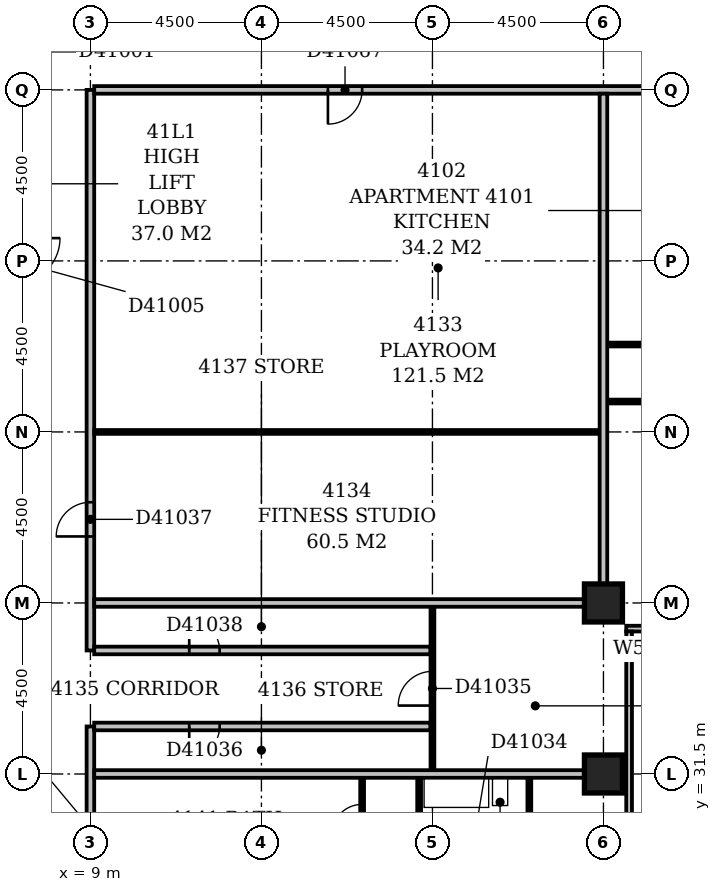
"""IFC4 building model, lengths in metres.
Left out: names, types, materials, properties, quantities, classifications, styles, units other than length and angle.
Written with IfcOpenShell. Run it as: python <this file> out.ifc"""

import sys

from ifc_helpers import new_model, si_unit, direction, frame, frame_2d, origin, origin_2d, place, context, subcontext, project, spatial, rectangle, extrude, element, fill, save


model = new_model("IFC4")
c1 = context("Model", 3, precision=1e-05, world=origin(), true_north=direction((0.0, 1.0)))
c2 = subcontext(c1, "Body", "Model", "MODEL_VIEW")
j1 = project(units=[si_unit("LENGTHUNIT", "METRE"), si_unit("PLANEANGLEUNIT", "RADIAN")], contexts=[c1])
p1 = place(None, origin())
s1 = spatial("IfcSite", under=j1, at=p1, CompositionType="ELEMENT")
p2 = place(p1, origin())
s2 = spatial("IfcBuilding", under=s1, at=p2, CompositionType="ELEMENT")
p3 = place(p2, frame((0.0, 0.0, 162.8)))
s3 = spatial("IfcBuildingStorey", under=s2, at=p3, CompositionType="ELEMENT", Elevation=162.8)
for number, where, z_axis, x_axis in (
    (1, (22.5, 31.5, -0.3), (0.0, 0.0, 1.0), (1.0, 0.0, 0.0)),
    (2, (22.5, 36.0, -0.3), (0.0, 0.0, 1.0), (1.0, 0.0, 0.0)),
):
    element("IfcColumn", number, at=place(p3, frame(where, z_axis=z_axis, x_axis=x_axis)), inside=s3, PredefinedType="COLUMN", context=c2, shape_type="SweptSolid", body=[
        extrude(rectangle(XDim=1.0, YDim=1.0, at=origin_2d()), origin(), (0.0, 0.0, 1.0), 3.6),
    ])
p4 = place(p3, frame((23.175, 17.4, 0.0), z_axis=(0.0, 0.0, 1.0), x_axis=(0.0, 1.0, 0.0)))
e3 = element("IfcWall", 3, at=p4, inside=s3, PredefinedType="STANDARD", context=c2, shape_type="SweptSolid", body=[
    extrude(rectangle(XDim=17.85, YDim=0.15, at=frame_2d((8.925, 0.0))), origin(), (0.0, 0.0, 1.0), 2.7),
])
p5 = place(p4, frame((1.65, 0.0, 0.6)))
e4 = element("IfcOpeningElement", 4, at=p5, cuts=e3, PredefinedType="OPENING", context=c2, shape_type="SweptSolid", body=[
    extrude(rectangle(XDim=2.4, YDim=1.8, at=frame_2d((1.2, 0.9))), frame((0.0, 0.087, 0.0), z_axis=(0.0, -1.0, 0.0), x_axis=(1.0, 0.0, 0.0)), (0.0, 0.0, 1.0), 0.174),
])
p6 = place(p4, frame((6.15, 0.0, 0.6)))
e5 = element("IfcOpeningElement", 5, at=p6, cuts=e3, PredefinedType="OPENING", context=c2, shape_type="SweptSolid", body=[
    extrude(rectangle(XDim=2.4, YDim=1.8, at=frame_2d((1.2, 0.9))), frame((0.0, 0.087, 0.0), z_axis=(0.0, -1.0, 0.0), x_axis=(1.0, 0.0, 0.0)), (0.0, 0.0, 1.0), 0.174),
])
p7 = place(p4, frame((10.65, 0.0, 0.6)))
e6 = element("IfcOpeningElement", 6, at=p7, cuts=e3, PredefinedType="OPENING", context=c2, shape_type="SweptSolid", body=[
    extrude(rectangle(XDim=2.4, YDim=1.8, at=frame_2d((1.2, 0.9))), frame((0.0, 0.087, 0.0), z_axis=(0.0, -1.0, 0.0), x_axis=(1.0, 0.0, 0.0)), (0.0, 0.0, 1.0), 0.174),
])
p8 = place(p4, frame((17.152, 0.0, 0.6)))
e7 = element("IfcOpeningElement", 7, at=p8, cuts=e3, PredefinedType="OPENING", context=c2, shape_type="SweptSolid", body=[
    extrude(rectangle(XDim=0.45, YDim=1.8, at=frame_2d((0.225, 0.9))), frame((0.0, 0.087, 0.0), z_axis=(0.0, -1.0, 0.0), x_axis=(1.0, 0.0, 0.0)), (0.0, 0.0, 1.0), 0.174),
])
p9 = place(p3, frame((23.1, 35.325, 0.0), z_axis=(0.0, 0.0, 1.0), x_axis=(1.0, 0.0, 0.0)))
e8 = element("IfcWall", 8, at=p9, inside=s3, PredefinedType="STANDARD", context=c2, shape_type="SweptSolid", body=[
    extrude(rectangle(XDim=45.15, YDim=0.15, at=frame_2d((22.575, 0.0))), origin(), (0.0, 0.0, 1.0), 2.7),
])
p10 = place(p9, frame((0.45, 0.0, 0.6)))
e9 = element("IfcOpeningElement", 9, at=p10, cuts=e8, PredefinedType="OPENING", context=c2, shape_type="SweptSolid", body=[
    extrude(rectangle(XDim=2.4, YDim=1.8, at=frame_2d((1.2, 0.9))), frame((0.0, 0.087, 0.0), z_axis=(0.0, -1.0, 0.0), x_axis=(1.0, 0.0, 0.0)), (0.0, 0.0, 1.0), 0.174),
])
p11 = place(p9, frame((4.95, 0.0, 0.6)))
e10 = element("IfcOpeningElement", 10, at=p11, cuts=e8, PredefinedType="OPENING", context=c2, shape_type="SweptSolid", body=[
    extrude(rectangle(XDim=2.4, YDim=1.8, at=frame_2d((1.2, 0.9))), frame((0.0, 0.087, 0.0), z_axis=(0.0, -1.0, 0.0), x_axis=(1.0, 0.0, 0.0)), (0.0, 0.0, 1.0), 0.174),
])
p12 = place(p9, frame((9.167, 0.0, 0.6)))
e11 = element("IfcOpeningElement", 11, at=p12, cuts=e8, PredefinedType="OPENING", context=c2, shape_type="SweptSolid", body=[
    extrude(rectangle(XDim=1.8, YDim=1.8, at=frame_2d((0.9, 0.9))), frame((0.0, 0.087, 0.0), z_axis=(0.0, -1.0, 0.0), x_axis=(1.0, 0.0, 0.0)), (0.0, 0.0, 1.0), 0.174),
])
p13 = place(p9, frame((14.895, 0.0, 0.6)))
e12 = element("IfcOpeningElement", 12, at=p13, cuts=e8, PredefinedType="OPENING", context=c2, shape_type="SweptSolid", body=[
    extrude(rectangle(XDim=1.8, YDim=1.8, at=frame_2d((0.9, 0.9))), frame((0.0, 0.087, 0.0), z_axis=(0.0, -1.0, 0.0), x_axis=(1.0, 0.0, 0.0)), (0.0, 0.0, 1.0), 0.174),
])
p14 = place(p9, frame((18.45, 0.0, 0.6)))
e13 = element("IfcOpeningElement", 13, at=p14, cuts=e8, PredefinedType="OPENING", context=c2, shape_type="SweptSolid", body=[
    extrude(rectangle(XDim=2.4, YDim=1.8, at=frame_2d((1.2, 0.9))), frame((0.0, 0.087, 0.0), z_axis=(0.0, -1.0, 0.0), x_axis=(1.0, 0.0, 0.0)), (0.0, 0.0, 1.0), 0.174),
])
p15 = place(p9, frame((22.95, 0.0, 0.6)))
e14 = element("IfcOpeningElement", 14, at=p15, cuts=e8, PredefinedType="OPENING", context=c2, shape_type="SweptSolid", body=[
    extrude(rectangle(XDim=2.4, YDim=1.8, at=frame_2d((1.2, 0.9))), frame((0.0, 0.087, 0.0), z_axis=(0.0, -1.0, 0.0), x_axis=(1.0, 0.0, 0.0)), (0.0, 0.0, 1.0), 0.174),
])
p16 = place(p9, frame((27.45, 0.0, 0.6)))
e15 = element("IfcOpeningElement", 15, at=p16, cuts=e8, PredefinedType="OPENING", context=c2, shape_type="SweptSolid", body=[
    extrude(rectangle(XDim=2.4, YDim=1.8, at=frame_2d((1.2, 0.9))), frame((0.0, 0.087, 0.0), z_axis=(0.0, -1.0, 0.0), x_axis=(1.0, 0.0, 0.0)), (0.0, 0.0, 1.0), 0.174),
])
p17 = place(p9, frame((31.95, 0.0, 0.6)))
e16 = element("IfcOpeningElement", 16, at=p17, cuts=e8, PredefinedType="OPENING", context=c2, shape_type="SweptSolid", body=[
    extrude(rectangle(XDim=2.4, YDim=1.8, at=frame_2d((1.2, 0.9))), frame((0.0, 0.087, 0.0), z_axis=(0.0, -1.0, 0.0), x_axis=(1.0, 0.0, 0.0)), (0.0, 0.0, 1.0), 0.174),
])
p18 = place(p9, frame((36.45, 0.0, 0.6)))
e17 = element("IfcOpeningElement", 17, at=p18, cuts=e8, PredefinedType="OPENING", context=c2, shape_type="SweptSolid", body=[
    extrude(rectangle(XDim=2.4, YDim=1.8, at=frame_2d((1.2, 0.9))), frame((0.0, 0.087, 0.0), z_axis=(0.0, -1.0, 0.0), x_axis=(1.0, 0.0, 0.0)), (0.0, 0.0, 1.0), 0.174),
])
p19 = place(p9, frame((40.61, 0.0, 0.6)))
e18 = element("IfcOpeningElement", 18, at=p19, cuts=e8, PredefinedType="OPENING", context=c2, shape_type="SweptSolid", body=[
    extrude(rectangle(XDim=1.2, YDim=1.8, at=frame_2d((0.6, 0.9))), frame((0.0, 0.087, 0.0), z_axis=(0.0, -1.0, 0.0), x_axis=(1.0, 0.0, 0.0)), (0.0, 0.0, 1.0), 0.174),
])
p20 = place(p3, frame((9.0, 5.0, 0.0), z_axis=(0.0, 0.0, 1.0), x_axis=(0.0, 1.0, 0.0)))
e19 = element("IfcWall", 19, at=p20, inside=s3, PredefinedType="PARTITIONING", context=c2, shape_type="SweptSolid", body=[
    extrude(rectangle(XDim=27.75, YDim=0.2, at=frame_2d((13.875, 0.0))), origin(), (0.0, 0.0, 1.0), 3.3),
])
p21 = place(p20, frame((22.8, 0.0, 0.0)))
e20 = element("IfcOpeningElement", 20, at=p21, cuts=e19, PredefinedType="OPENING", context=c2, shape_type="SweptSolid", body=[
    extrude(rectangle(XDim=1.0, YDim=2.1, at=frame_2d((0.5, 1.05))), frame((0.0, 0.112, 0.0), z_axis=(0.0, -1.0, 0.0), x_axis=(1.0, 0.0, 0.0)), (0.0, 0.0, 1.0), 0.224),
])
p22 = place(p20, frame((14.95, 0.0, 0.0)))
e21 = element("IfcOpeningElement", 21, at=p22, cuts=e19, PredefinedType="OPENING", context=c2, shape_type="SweptSolid", body=[
    extrude(rectangle(XDim=1.0, YDim=2.1, at=frame_2d((0.5, 1.05))), frame((0.0, 0.112, 0.0), z_axis=(0.0, -1.0, 0.0), x_axis=(1.0, 0.0, 0.0)), (0.0, 0.0, 1.0), 0.224),
])
p23 = place(p20, frame((9.3, 0.0, 0.0)))
e22 = element("IfcOpeningElement", 22, at=p23, cuts=e19, PredefinedType="OPENING", context=c2, shape_type="SweptSolid", body=[
    extrude(rectangle(XDim=1.0, YDim=2.1, at=frame_2d((0.5, 1.05))), frame((0.0, 0.112, 0.0), z_axis=(0.0, -1.0, 0.0), x_axis=(1.0, 0.0, 0.0)), (0.0, 0.0, 1.0), 0.224),
])
p24 = place(p20, frame((1.5, 0.0, 0.0)))
e23 = element("IfcOpeningElement", 23, at=p24, cuts=e19, PredefinedType="OPENING", context=c2, shape_type="SweptSolid", body=[
    extrude(rectangle(XDim=0.9, YDim=2.1, at=frame_2d((0.45, 1.05))), frame((0.0, 0.112, 0.0), z_axis=(0.0, -1.0, 0.0), x_axis=(1.0, 0.0, 0.0)), (0.0, 0.0, 1.0), 0.224),
])
p25 = place(p3, frame((17.65, 22.6, 0.0), z_axis=(0.0, 0.0, 1.0), x_axis=(0.0, 1.0, 0.0)))
e24 = element("IfcWall", 24, at=p25, inside=s3, PredefinedType="PARTITIONING", context=c2, shape_type="SweptSolid", body=[
    extrude(rectangle(XDim=8.8, YDim=0.1, at=frame_2d((4.4, 0.0))), origin(), (0.0, 0.0, 1.0), 3.3),
])
p26 = place(p25, frame((1.7, 0.0, 0.0)))
e25 = element("IfcOpeningElement", 25, at=p26, cuts=e24, PredefinedType="OPENING", context=c2, shape_type="SweptSolid", body=[
    extrude(rectangle(XDim=0.9, YDim=2.1, at=frame_2d((0.45, 1.05))), frame((0.0, 0.062, 0.0), z_axis=(0.0, -1.0, 0.0), x_axis=(1.0, 0.0, 0.0)), (0.0, 0.0, 1.0), 0.124),
])
p27 = place(p25, frame((5.05, 0.0, 0.0)))
e26 = element("IfcOpeningElement", 26, at=p27, cuts=e24, PredefinedType="OPENING", context=c2, shape_type="SweptSolid", body=[
    extrude(rectangle(XDim=0.9, YDim=2.1, at=frame_2d((0.45, 1.05))), frame((0.0, 0.062, 0.0), z_axis=(0.0, -1.0, 0.0), x_axis=(1.0, 0.0, 0.0)), (0.0, 0.0, 1.0), 0.124),
])
p28 = place(p3, frame((16.15, 29.1, 0.0), z_axis=(0.0, 0.0, 1.0), x_axis=(0.0, 1.0, 0.0)))
e27 = element("IfcWall", 27, at=p28, inside=s3, PredefinedType="PARTITIONING", context=c2, shape_type="SweptSolid", body=[
    extrude(rectangle(XDim=2.3, YDim=0.1, at=frame_2d((1.15, 0.0))), origin(), (0.0, 0.0, 1.0), 3.3),
])
p29 = place(p28, frame((0.8, 0.0, 0.0)))
e28 = element("IfcOpeningElement", 28, at=p29, cuts=e27, PredefinedType="OPENING", context=c2, shape_type="SweptSolid", body=[
    extrude(rectangle(XDim=0.8, YDim=2.1, at=frame_2d((0.4, 1.05))), frame((0.0, 0.062, 0.0), z_axis=(0.0, -1.0, 0.0), x_axis=(1.0, 0.0, 0.0)), (0.0, 0.0, 1.0), 0.124),
])
p30 = place(p3, frame((20.55, 29.2, 0.0), z_axis=(0.0, 0.0, 1.0), x_axis=(0.0, 1.0, 0.0)))
e29 = element("IfcWall", 29, at=p30, inside=s3, PredefinedType="PLUMBINGWALL", context=c2, shape_type="SweptSolid", body=[
    extrude(rectangle(XDim=2.2, YDim=0.1, at=frame_2d((1.1, 0.0))), origin(), (0.0, 0.0, 1.0), 3.3),
])
p31 = place(p3, frame((9.1, 31.5, 0.0), z_axis=(0.0, 0.0, 1.0), x_axis=(1.0, 0.0, 0.0)))
e30 = element("IfcWall", 30, at=p31, inside=s3, PredefinedType="PARTITIONING", context=c2, shape_type="SweptSolid", body=[
    extrude(rectangle(XDim=12.9, YDim=0.2, at=frame_2d((6.45, 0.0))), origin(), (0.0, 0.0, 1.0), 3.3),
])
p32 = place(p3, frame((18.0, 31.6, 0.0), z_axis=(0.0, 0.0, 1.0), x_axis=(0.0, 1.0, 0.0)))
e31 = element("IfcWall", 31, at=p32, inside=s3, PredefinedType="PARTITIONING", context=c2, shape_type="SweptSolid", body=[
    extrude(rectangle(XDim=4.3, YDim=0.1, at=frame_2d((2.15, 0.0))), origin(), (0.0, 0.0, 1.0), 3.3),
])
p33 = place(p32, frame((1.7, 0.0, 0.0)))
e32 = element("IfcOpeningElement", 32, at=p33, cuts=e31, PredefinedType="OPENING", context=c2, shape_type="SweptSolid", body=[
    extrude(rectangle(XDim=0.9, YDim=2.1, at=frame_2d((0.45, 1.05))), frame((0.0, 0.062, 0.0), z_axis=(0.0, -1.0, 0.0), x_axis=(1.0, 0.0, 0.0)), (0.0, 0.0, 1.0), 0.124),
])
p34 = place(p3, frame((9.1, 32.75, 0.0), z_axis=(0.0, 0.0, 1.0), x_axis=(1.0, 0.0, 0.0)))
e33 = element("IfcWall", 33, at=p34, inside=s3, PredefinedType="PARTITIONING", context=c2, shape_type="SweptSolid", body=[
    extrude(rectangle(XDim=8.85, YDim=0.2, at=frame_2d((4.425, 0.0))), origin(), (0.0, 0.0, 1.0), 3.3),
])
p35 = place(p34, frame((2.5, 0.0, 0.0)))
e34 = element("IfcOpeningElement", 34, at=p35, cuts=e33, PredefinedType="OPENING", context=c2, shape_type="SweptSolid", body=[
    extrude(rectangle(XDim=0.8, YDim=2.1, at=frame_2d((0.4, 1.05))), frame((0.0, 0.112, 0.0), z_axis=(0.0, -1.0, 0.0), x_axis=(1.0, 0.0, 0.0)), (0.0, 0.0, 1.0), 0.224),
])
p36 = place(p3, frame((9.0, 34.75, 0.0), z_axis=(0.0, 0.0, 1.0), x_axis=(0.0, 1.0, 0.0)))
e35 = element("IfcWall", 35, at=p36, inside=s3, PredefinedType="PARTITIONING", context=c2, shape_type="SweptSolid", body=[
    extrude(rectangle(XDim=14.75, YDim=0.2, at=frame_2d((7.375, 0.0))), origin(), (0.0, 0.0, 1.0), 3.3),
])
p37 = place(p36, frame((3.0, 0.0, 0.0)))
e36 = element("IfcOpeningElement", 36, at=p37, cuts=e35, PredefinedType="OPENING", context=c2, shape_type="SweptSolid", body=[
    extrude(rectangle(XDim=0.9, YDim=2.1, at=frame_2d((0.45, 1.05))), frame((0.0, 0.112, 0.0), z_axis=(0.0, -1.0, 0.0), x_axis=(1.0, 0.0, 0.0)), (0.0, 0.0, 1.0), 0.224),
])
p38 = place(p3, frame((9.1, 34.75, 0.0), z_axis=(0.0, 0.0, 1.0), x_axis=(1.0, 0.0, 0.0)))
e37 = element("IfcWall", 37, at=p38, inside=s3, PredefinedType="PARTITIONING", context=c2, shape_type="SweptSolid", body=[
    extrude(rectangle(XDim=8.85, YDim=0.2, at=frame_2d((4.425, 0.0))), origin(), (0.0, 0.0, 1.0), 3.3),
])
p39 = place(p38, frame((2.5, 0.0, 0.0)))
e38 = element("IfcOpeningElement", 38, at=p39, cuts=e37, PredefinedType="OPENING", context=c2, shape_type="SweptSolid", body=[
    extrude(rectangle(XDim=0.8, YDim=2.1, at=frame_2d((0.4, 1.05))), frame((0.0, 0.112, 0.0), z_axis=(0.0, -1.0, 0.0), x_axis=(1.0, 0.0, 0.0)), (0.0, 0.0, 1.0), 0.224),
])
for number, where, z_axis, x_axis in (
    (39, (9.1, 36.0, 0.0), (0.0, 0.0, 1.0), (1.0, 0.0, 0.0)),
    (40, (22.5, 36.5, 0.0), (0.0, 0.0, 1.0), (0.0, 1.0, 0.0)),
):
    element("IfcWall", number, at=place(p3, frame(where, z_axis=z_axis, x_axis=x_axis)), inside=s3, PredefinedType="PARTITIONING", context=c2, shape_type="SweptSolid", body=[
        extrude(rectangle(XDim=12.9, YDim=0.2, at=frame_2d((6.45, 0.0))), origin(), (0.0, 0.0, 1.0), 3.3),
    ])
p40 = place(p3, frame((9.1, 40.5, 0.0), z_axis=(0.0, 0.0, 1.0), x_axis=(1.0, 0.0, 0.0)))
e41 = element("IfcWall", 41, at=p40, inside=s3, PredefinedType="PARTITIONING", context=c2, shape_type="SweptSolid", body=[
    extrude(rectangle(XDim=13.3, YDim=0.1, at=frame_2d((6.65, 0.0))), origin(), (0.0, 0.0, 1.0), 3.3),
])
p41 = place(p3, frame((22.6, 41.3, 0.0), z_axis=(0.0, 0.0, 1.0), x_axis=(1.0, 0.0, 0.0)))
e42 = element("IfcWall", 42, at=p41, inside=s3, PredefinedType="PARTITIONING", context=c2, shape_type="SweptSolid", body=[
    extrude(rectangle(XDim=17.8, YDim=0.1, at=frame_2d((8.9, 0.0))), origin(), (0.0, 0.0, 1.0), 3.3),
])
p42 = place(p41, frame((3.9, 0.0, 0.0)))
e43 = element("IfcOpeningElement", 43, at=p42, cuts=e42, PredefinedType="OPENING", context=c2, shape_type="SweptSolid", body=[
    extrude(rectangle(XDim=0.9, YDim=2.1, at=frame_2d((0.45, 1.05))), frame((0.0, 0.062, 0.0), z_axis=(0.0, -1.0, 0.0), x_axis=(1.0, 0.0, 0.0)), (0.0, 0.0, 1.0), 0.124),
])
p43 = place(p41, frame((10.7, 0.0, 0.0)))
e44 = element("IfcOpeningElement", 44, at=p43, cuts=e42, PredefinedType="OPENING", context=c2, shape_type="SweptSolid", body=[
    extrude(rectangle(XDim=0.9, YDim=2.1, at=frame_2d((0.45, 1.05))), frame((0.0, 0.062, 0.0), z_axis=(0.0, -1.0, 0.0), x_axis=(1.0, 0.0, 0.0)), (0.0, 0.0, 1.0), 0.124),
])
p44 = place(p41, frame((14.05, 0.0, 0.0)))
e45 = element("IfcOpeningElement", 45, at=p44, cuts=e42, PredefinedType="OPENING", context=c2, shape_type="SweptSolid", body=[
    extrude(rectangle(XDim=0.9, YDim=2.1, at=frame_2d((0.45, 1.05))), frame((0.0, 0.062, 0.0), z_axis=(0.0, -1.0, 0.0), x_axis=(1.0, 0.0, 0.0)), (0.0, 0.0, 1.0), 0.124),
])
p45 = place(p3, frame((22.6, 42.8, 0.0), z_axis=(0.0, 0.0, 1.0), x_axis=(1.0, 0.0, 0.0)))
e46 = element("IfcWall", 46, at=p45, inside=s3, PredefinedType="PARTITIONING", context=c2, shape_type="SweptSolid", body=[
    extrude(rectangle(XDim=4.95, YDim=0.1, at=frame_2d((2.475, 0.0))), origin(), (0.0, 0.0, 1.0), 3.3),
])
p46 = place(p45, frame((2.0, 0.0, 0.0)))
e47 = element("IfcOpeningElement", 47, at=p46, cuts=e46, PredefinedType="OPENING", context=c2, shape_type="SweptSolid", body=[
    extrude(rectangle(XDim=0.9, YDim=2.1, at=frame_2d((0.45, 1.05))), frame((0.0, 0.062, 0.0), z_axis=(0.0, -1.0, 0.0), x_axis=(1.0, 0.0, 0.0)), (0.0, 0.0, 1.0), 0.124),
])
p47 = place(p3, frame((9.1, 49.5, 0.0), z_axis=(0.0, 0.0, 1.0), x_axis=(1.0, 0.0, 0.0)))
e48 = element("IfcWall", 48, at=p47, inside=s3, PredefinedType="PARTITIONING", context=c2, shape_type="SweptSolid", body=[
    extrude(rectangle(XDim=32.55, YDim=0.2, at=frame_2d((16.275, 0.0))), origin(), (0.0, 0.0, 1.0), 3.3),
])
p48 = place(p47, frame((18.8, 0.0, 0.0)))
e49 = element("IfcOpeningElement", 49, at=p48, cuts=e48, PredefinedType="OPENING", context=c2, shape_type="SweptSolid", body=[
    extrude(rectangle(XDim=1.0, YDim=2.1, at=frame_2d((0.5, 1.05))), frame((0.0, 0.112, 0.0), z_axis=(0.0, -1.0, 0.0), x_axis=(1.0, 0.0, 0.0)), (0.0, 0.0, 1.0), 0.224),
])
p49 = place(p47, frame((6.15, 0.0, 0.0)))
e50 = element("IfcOpeningElement", 50, at=p49, cuts=e48, PredefinedType="OPENING", context=c2, shape_type="SweptSolid", body=[
    extrude(rectangle(XDim=0.9, YDim=2.1, at=frame_2d((0.45, 1.05))), frame((0.0, 0.112, 0.0), z_axis=(0.0, -1.0, 0.0), x_axis=(1.0, 0.0, 0.0)), (0.0, 0.0, 1.0), 0.224),
])
p50 = place(p8, origin())
e51 = element("IfcWindow", 51, at=p50, inside=s3, PartitioningType="SINGLE_PANEL", PredefinedType="WINDOW", context=c2, shape_type="SweptSolid", body=[
    extrude(rectangle(XDim=0.45, YDim=1.8, at=frame_2d((0.225, 0.9))), frame((0.0, 0.03, 0.0), z_axis=(0.0, -1.0, 0.0), x_axis=(1.0, 0.0, 0.0)), (0.0, 0.0, 1.0), 0.06),
])
fill(e7, e51)
p51 = place(p29, origin())
e52 = element("IfcDoor", 52, at=p51, inside=s3, OperationType="SINGLE_SWING_LEFT", PredefinedType="DOOR", context=c2, shape_type="SweptSolid", body=[
    extrude(rectangle(XDim=0.8, YDim=2.1, at=frame_2d((0.4, 1.05))), frame((0.0, 0.025, 0.0), z_axis=(0.0, -1.0, 0.0), x_axis=(1.0, 0.0, 0.0)), (0.0, 0.0, 1.0), 0.05),
])
fill(e28, e52)
p52 = place(p33, origin())
e53 = element("IfcDoor", 53, at=p52, inside=s3, OperationType="SINGLE_SWING_LEFT", PredefinedType="DOOR", context=c2, shape_type="SweptSolid", body=[
    extrude(rectangle(XDim=0.9, YDim=2.1, at=frame_2d((0.45, 1.05))), frame((0.0, 0.025, 0.0), z_axis=(0.0, -1.0, 0.0), x_axis=(1.0, 0.0, 0.0)), (0.0, 0.0, 1.0), 0.05),
])
fill(e32, e53)
p53 = place(p35, frame((0.8, 0.0, 0.0), z_axis=(0.0, 0.0, 1.0), x_axis=(-1.0, 0.0, 0.0)))
e54 = element("IfcDoor", 54, at=p53, inside=s3, OperationType="SINGLE_SWING_RIGHT", PredefinedType="DOOR", context=c2, shape_type="SweptSolid", body=[
    extrude(rectangle(XDim=0.8, YDim=2.1, at=frame_2d((0.4, 1.05))), frame((0.0, 0.025, 0.0), z_axis=(0.0, -1.0, 0.0), x_axis=(1.0, 0.0, 0.0)), (0.0, 0.0, 1.0), 0.05),
])
fill(e34, e54)
p54 = place(p37, origin())
e55 = element("IfcDoor", 55, at=p54, inside=s3, OperationType="SINGLE_SWING_LEFT", PredefinedType="DOOR", context=c2, shape_type="SweptSolid", body=[
    extrude(rectangle(XDim=0.9, YDim=2.1, at=frame_2d((0.45, 1.05))), frame((0.0, 0.025, 0.0), z_axis=(0.0, -1.0, 0.0), x_axis=(1.0, 0.0, 0.0)), (0.0, 0.0, 1.0), 0.05),
])
fill(e36, e55)
p55 = place(p39, origin())
e56 = element("IfcDoor", 56, at=p55, inside=s3, OperationType="SINGLE_SWING_LEFT", PredefinedType="DOOR", context=c2, shape_type="SweptSolid", body=[
    extrude(rectangle(XDim=0.8, YDim=2.1, at=frame_2d((0.4, 1.05))), frame((0.0, 0.025, 0.0), z_axis=(0.0, -1.0, 0.0), x_axis=(1.0, 0.0, 0.0)), (0.0, 0.0, 1.0), 0.05),
])
fill(e38, e56)
p56 = place(p49, frame((0.9, 0.0, 0.0), z_axis=(0.0, 0.0, 1.0), x_axis=(-1.0, 0.0, 0.0)))
e57 = element("IfcDoor", 57, at=p56, inside=s3, OperationType="SINGLE_SWING_RIGHT", PredefinedType="DOOR", context=c2, shape_type="SweptSolid", body=[
    extrude(rectangle(XDim=0.9, YDim=2.1, at=frame_2d((0.45, 1.05))), frame((0.0, 0.025, 0.0), z_axis=(0.0, -1.0, 0.0), x_axis=(1.0, 0.0, 0.0)), (0.0, 0.0, 1.0), 0.05),
])
fill(e50, e57)
save(model, sys.argv[1])
